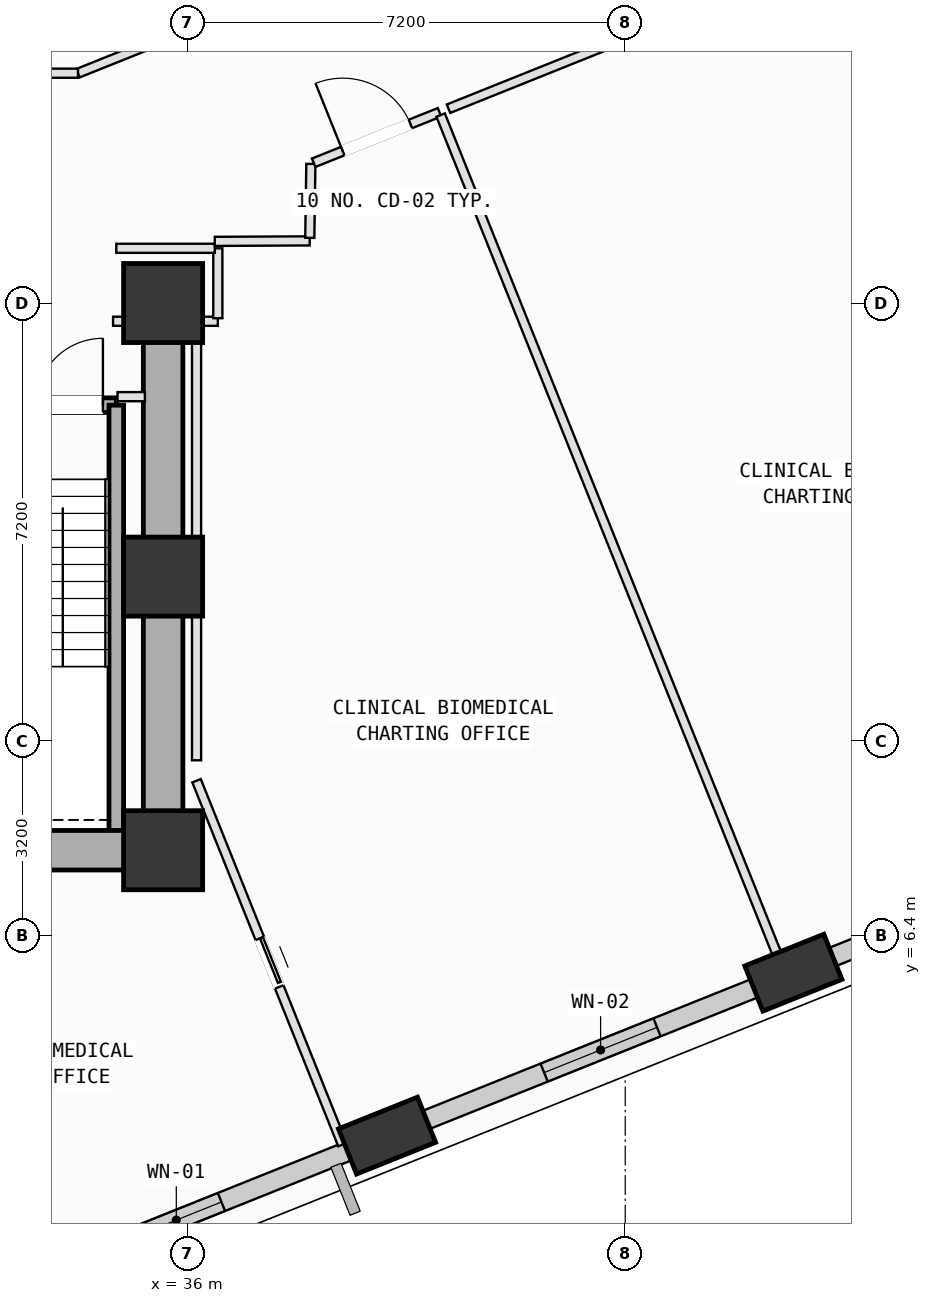
"""IFC4 building model, lengths in metres.
Left out: names, types, materials, properties, quantities, classifications, styles, units other than length and angle.
Written with IfcOpenShell. Run it as: python <this file> out.ifc"""

import sys

from ifc_helpers import new_model, si_unit, direction, frame, frame_2d, origin, origin_2d, place, context, subcontext, project, spatial, rectangle, extrude, element, fill, save


model = new_model("IFC4")
c1 = context("Model", 3, precision=1e-05, world=origin(), true_north=direction((0.0, 1.0)))
c2 = subcontext(c1, "Body", "Model", "MODEL_VIEW")
j1 = project(units=[si_unit("LENGTHUNIT", "METRE"), si_unit("PLANEANGLEUNIT", "RADIAN")], contexts=[c1])
p1 = place(None, origin())
s1 = spatial("IfcSite", under=j1, at=p1, CompositionType="ELEMENT")
p2 = place(p1, origin())
s2 = spatial("IfcBuilding", under=s1, at=p2, CompositionType="ELEMENT")
p3 = place(p2, frame((0.0, 0.0, 116.4)))
s3 = spatial("IfcBuildingStorey", under=s2, at=p3, CompositionType="ELEMENT", Elevation=116.4)
for number, where, z_axis, x_axis in (
    (1, (35.6, 7.8, 0.0), (0.0, 0.0, 1.0), (1.0, 0.0, 0.0)),
    (2, (35.6, 12.3, 0.0), (0.0, 0.0, 1.0), (1.0, 0.0, 0.0)),
    (3, (35.6, 16.8, 0.0), (0.0, 0.0, 1.0), (1.0, 0.0, 0.0)),
):
    element("IfcColumn", number, at=place(p3, frame(where, z_axis=z_axis, x_axis=x_axis)), inside=s3, PredefinedType="COLUMN", context=c2, shape_type="SweptSolid", body=[
        extrude(rectangle(XDim=1.3, YDim=1.3, at=origin_2d()), origin(), (0.0, 0.0, 1.0), 4.0),
    ])
p4 = place(p3, frame((39.282, 3.106, 0.002), z_axis=(0.089357523849, 0.024149038099, 0.995706812717), x_axis=(-0.599896462323, 0.799335620141, 0.034449976294)))
e4 = element("IfcColumn", 4, at=p4, inside=s3, PredefinedType="COLUMN", context=c2, shape_type="SweptSolid", body=[
    extrude(rectangle(XDim=1.4, YDim=0.8, at=origin_2d()), origin(), (0.0, 0.0, 1.0), 4.014),
])
p5 = place(p3, frame((45.965, 5.786, 0.002), z_axis=(0.078035956114, 0.051638758177, 0.995612288096), x_axis=(-0.821217291899, 0.569551828945, 0.034826335313)))
e5 = element("IfcColumn", 5, at=p5, inside=s3, PredefinedType="COLUMN", context=c2, shape_type="SweptSolid", body=[
    extrude(rectangle(XDim=1.4, YDim=0.8, at=origin_2d()), origin(), (0.0, 0.0, 1.0), 4.014),
])
p6 = place(p3, frame((38.993, 2.99, 0.0), z_axis=(0.0, 0.0, 1.0), x_axis=(-0.928164774406, -0.372169519913, 0.0)))
e6 = element("IfcWall", 6, at=p6, inside=s3, PredefinedType="SOLIDWALL", context=c2, shape_type="SweptSolid", body=[
    extrude(rectangle(XDim=6.214, YDim=0.32, at=frame_2d((3.107, 0.0))), origin(), (0.0, 0.0, 1.0), 3.165),
])
p7 = place(p6, frame((2.622, 0.0, 0.75)))
e7 = element("IfcOpeningElement", 7, at=p7, cuts=e6, PredefinedType="OPENING", context=c2, shape_type="SweptSolid", body=[
    extrude(rectangle(XDim=1.6, YDim=1.95, at=frame_2d((0.8, 0.975))), frame((0.0, 0.17, 0.0), z_axis=(0.0, -1.0, 0.0), x_axis=(1.0, 0.0, 0.0)), (0.0, 0.0, 1.0), 0.34),
])
p8 = place(p3, frame((45.677, 5.67, 0.0), z_axis=(0.0, 0.0, 1.0), x_axis=(-0.928164509938, -0.372170179477, 0.0)))
e8 = element("IfcWall", 8, at=p8, inside=s3, PredefinedType="SOLIDWALL", context=c2, shape_type="SweptSolid", body=[
    extrude(rectangle(XDim=6.209, YDim=0.32, at=frame_2d((3.104, 0.0))), origin(), (0.0, 0.0, 1.0), 3.165),
])
p9 = place(p8, frame((2.105, 0.0, 0.75)))
e9 = element("IfcOpeningElement", 9, at=p9, cuts=e8, PredefinedType="OPENING", context=c2, shape_type="SweptSolid", body=[
    extrude(rectangle(XDim=2.0, YDim=1.95, at=frame_2d((1.0, 0.975))), frame((0.0, 0.17, 0.0), z_axis=(0.0, -1.0, 0.0), x_axis=(1.0, 0.0, 0.0)), (0.0, 0.0, 1.0), 0.34),
])
p10 = place(p3, frame((52.366, 8.353, 0.0), z_axis=(0.0, 0.0, 1.0), x_axis=(-0.928164972463, -0.372169025972, 0.0)))
e10 = element("IfcWall", 10, at=p10, inside=s3, PredefinedType="SOLIDWALL", context=c2, shape_type="SweptSolid", body=[
    extrude(rectangle(XDim=6.218, YDim=0.32, at=frame_2d((3.109, 0.0))), origin(), (0.0, 0.0, 1.0), 3.165),
])
p11 = place(p10, frame((2.411, 0.0, 0.75)))
e11 = element("IfcOpeningElement", 11, at=p11, cuts=e10, PredefinedType="OPENING", context=c2, shape_type="SweptSolid", body=[
    extrude(rectangle(XDim=1.4, YDim=1.85, at=frame_2d((0.7, 0.925))), frame((0.0, 0.17, 0.0), z_axis=(0.0, -1.0, 0.0), x_axis=(1.0, 0.0, 0.0)), (0.0, 0.0, 1.0), 0.34),
])
p12 = place(p3, frame((31.37, 15.12, 0.0), z_axis=(0.0, 0.0, 1.0), x_axis=(1.0, 0.0, 0.0)))
e12 = element("IfcWall", 12, at=p12, inside=s3, PredefinedType="SOLIDWALL", context=c2, shape_type="SweptSolid", body=[
    extrude(rectangle(XDim=3.46, YDim=0.24, at=frame_2d((1.73, 0.0))), origin(), (0.0, 0.0, 1.0), 3.78),
])
p13 = place(p12, frame((2.14, 0.0, 0.0)))
e13 = element("IfcOpeningElement", 13, at=p13, cuts=e12, PredefinedType="OPENING", context=c2, shape_type="SweptSolid", body=[
    extrude(rectangle(XDim=1.1, YDim=2.15, at=frame_2d((0.55, 1.075))), frame((0.0, 0.13, 0.0), z_axis=(0.0, -1.0, 0.0), x_axis=(1.0, 0.0, 0.0)), (0.0, 0.0, 1.0), 0.26),
])
p14 = place(p3, frame((34.83, 15.12, 0.0), z_axis=(0.0, 0.0, 1.0), x_axis=(0.0, -1.0, 0.0)))
e14 = element("IfcWall", 14, at=p14, inside=s3, PredefinedType="SOLIDWALL", context=c2, shape_type="SweptSolid", body=[
    extrude(rectangle(XDim=6.995, YDim=0.24, at=frame_2d((3.498, 0.0))), origin(), (0.0, 0.0, 1.0), 3.78),
])
p15 = place(p3, frame((24.8, 7.8, 0.0), z_axis=(0.0, 0.0, 1.0), x_axis=(1.0, 0.0, 0.0)))
e15 = element("IfcWall", 15, at=p15, inside=s3, PredefinedType="SHEAR", context=c2, shape_type="SweptSolid", body=[
    extrude(rectangle(XDim=10.8, YDim=0.65, at=frame_2d((5.4, 0.0))), origin(), (0.0, 0.0, 1.0), 3.78),
])
p16 = place(p3, frame((35.6, 7.8, 0.0), z_axis=(0.0, 0.0, 1.0), x_axis=(0.0, 1.0, 0.0)))
e16 = element("IfcWall", 16, at=p16, inside=s3, PredefinedType="SHEAR", context=c2, shape_type="SweptSolid", body=[
    extrude(rectangle(XDim=9.0, YDim=0.65, at=frame_2d((4.5, 0.0))), origin(), (0.0, 0.0, 1.0), 3.78),
])
p17 = place(p3, frame((36.15, 8.943, 0.0), z_axis=(0.0, 0.0, 1.0), x_axis=(0.372206491807, -0.9281499488, 0.0)))
e17 = element("IfcWall", 17, at=p17, inside=s3, PredefinedType="PARTITIONING", context=c2, shape_type="SweptSolid", body=[
    extrude(rectangle(XDim=6.448, YDim=0.15, at=frame_2d((3.224, 0.0))), origin(), (0.0, 0.0, 1.0), 3.78),
])
p18 = place(p17, frame((2.794, 0.0, 0.0)))
e18 = element("IfcOpeningElement", 18, at=p18, cuts=e17, PredefinedType="OPENING", context=c2, shape_type="SweptSolid", body=[
    extrude(rectangle(XDim=0.86, YDim=2.06, at=frame_2d((0.43, 1.03))), frame((0.0, 0.085, 0.0), z_axis=(0.0, -1.0, 0.0), x_axis=(1.0, 0.0, 0.0)), (0.0, 0.0, 1.0), 0.17),
])
p19 = place(p3, frame((35.6, 7.5, 0.0), z_axis=(0.0, 0.0, 1.0), x_axis=(1.0, 0.0, 0.0)))
e19 = element("IfcWall", 19, at=p19, inside=s3, PredefinedType="PARTITIONING", context=c2, shape_type="SweptSolid", body=[
    extrude(rectangle(XDim=0.55, YDim=0.15, at=frame_2d((0.275, 0.0))), origin(), (0.0, 0.0, 1.0), 2.965),
])
p20 = place(p3, frame((36.15, 7.5, 0.0), z_axis=(0.0, 0.0, 1.0), x_axis=(0.0, 1.0, 0.0)))
e20 = element("IfcWall", 20, at=p20, inside=s3, PredefinedType="PARTITIONING", context=c2, shape_type="SweptSolid", body=[
    extrude(rectangle(XDim=0.744, YDim=0.15, at=frame_2d((0.372, 0.0))), origin(), (0.0, 0.0, 1.0), 3.78),
])
p21 = place(p3, frame((34.777, 16.5, 0.0), z_axis=(0.0, 0.0, 1.0), x_axis=(1.0, 0.0, 0.0)))
e21 = element("IfcWall", 21, at=p21, inside=s3, PredefinedType="PARTITIONING", context=c2, shape_type="SweptSolid", body=[
    extrude(rectangle(XDim=0.523, YDim=0.15, at=frame_2d((0.261, 0.0))), origin(), (0.0, 0.0, 1.0), 2.965),
])
p22 = place(p3, frame((35.9, 16.5, 0.0), z_axis=(0.0, 0.0, 1.0), x_axis=(1.0, 0.0, 0.0)))
e22 = element("IfcWall", 22, at=p22, inside=s3, PredefinedType="PARTITIONING", context=c2, shape_type="SweptSolid", body=[
    extrude(rectangle(XDim=0.6, YDim=0.15, at=frame_2d((0.3, 0.0))), origin(), (0.0, 0.0, 1.0), 2.965),
])
p23 = place(p3, frame((36.5, 16.55, 0.0), z_axis=(0.0, 0.0, 1.0), x_axis=(0.0, 1.0, 0.0)))
e23 = element("IfcWall", 23, at=p23, inside=s3, PredefinedType="PARTITIONING", context=c2, shape_type="SweptSolid", body=[
    extrude(rectangle(XDim=1.15, YDim=0.15, at=frame_2d((0.575, 0.0))), origin(), (0.0, 0.0, 1.0), 3.78),
])
p24 = place(p3, frame((36.45, 17.7, 0.0), z_axis=(0.0, 0.0, 1.0), x_axis=(-1.0, 0.0, 0.0)))
e24 = element("IfcWall", 24, at=p24, inside=s3, PredefinedType="PARTITIONING", context=c2, shape_type="SweptSolid", body=[
    extrude(rectangle(XDim=1.62, YDim=0.15, at=frame_2d((0.81, 0.0))), origin(), (0.0, 0.0, 1.0), 3.78),
])
p25 = place(p3, frame((36.45, 17.814, 0.0), z_axis=(0.0, 0.0, 1.0), x_axis=(0.999986681849, 0.005161019784, 0.0)))
e25 = element("IfcWall", 25, at=p25, inside=s3, PredefinedType="PARTITIONING", context=c2, shape_type="SweptSolid", body=[
    extrude(rectangle(XDim=1.561, YDim=0.15, at=frame_2d((0.781, 0.0))), origin(), (0.0, 0.0, 1.0), 2.965),
])
p26 = place(p3, frame((38.012, 17.872, 0.0), z_axis=(0.0, 0.0, 1.0), x_axis=(0.014857797519, 0.999889616834, 0.0)))
e26 = element("IfcWall", 26, at=p26, inside=s3, PredefinedType="PARTITIONING", context=c2, shape_type="SweptSolid", body=[
    extrude(rectangle(XDim=1.216, YDim=0.15, at=frame_2d((0.608, 0.0))), origin(), (0.0, 0.0, 1.0), 3.78),
])
p27 = place(p3, frame((38.076, 19.107, 0.0), z_axis=(0.0, 0.0, 1.0), x_axis=(0.928098589705, 0.372334537463, 0.0)))
e27 = element("IfcWall", 27, at=p27, inside=s3, PredefinedType="PARTITIONING", context=c2, shape_type="SweptSolid", body=[
    extrude(rectangle(XDim=2.229, YDim=0.15, at=frame_2d((1.115, 0.0))), origin(), (0.0, 0.0, 1.0), 2.945),
])
p28 = place(p27, frame((0.515, 0.0, 0.0)))
e28 = element("IfcOpeningElement", 28, at=p28, cuts=e27, PredefinedType="OPENING", context=c2, shape_type="SweptSolid", body=[
    extrude(rectangle(XDim=1.2, YDim=2.15, at=frame_2d((0.6, 1.075))), frame((0.0, 0.085, 0.0), z_axis=(0.0, -1.0, 0.0), x_axis=(1.0, 0.0, 0.0)), (0.0, 0.0, 1.0), 0.17),
])
p29 = place(p3, frame((40.164, 19.891, 0.0), z_axis=(0.0, 0.0, 1.0), x_axis=(0.372132851531, -0.928179476616, 0.0)))
e29 = element("IfcWall", 29, at=p29, inside=s3, PredefinedType="PARTITIONING", context=c2, shape_type="SweptSolid", body=[
    extrude(rectangle(XDim=15.481, YDim=0.15, at=frame_2d((7.74, 0.0))), origin(), (0.0, 0.0, 1.0), 3.78),
])
p30 = place(p3, frame((39.999, 3.146, 0.0), z_axis=(0.0, 0.0, 1.0), x_axis=(-0.928153569213, -0.372197463663, 0.0)))
e30 = element("IfcWall", 30, at=p30, inside=s3, PredefinedType="PARTITIONING", context=c2, shape_type="SweptSolid", body=[
    extrude(rectangle(XDim=0.991, YDim=0.15, at=frame_2d((0.496, 0.0))), origin(), (0.0, 0.0, 1.0), 3.165),
])
p31 = place(p3, frame((36.15, 9.279, 0.0), z_axis=(0.0, 0.0, 1.0), x_axis=(0.0, 1.0, 0.0)))
e31 = element("IfcWall", 31, at=p31, inside=s3, PredefinedType="PARTITIONING", context=c2, shape_type="SweptSolid", body=[
    extrude(rectangle(XDim=7.061, YDim=0.15, at=frame_2d((3.531, 0.0))), origin(), (0.0, 0.0, 1.0), 3.78),
])
p32 = place(p3, frame((35.3, 15.26, 0.0), z_axis=(0.0, 0.0, 1.0), x_axis=(-1.0, 0.0, 0.0)))
e32 = element("IfcWall", 32, at=p32, inside=s3, PredefinedType="PARTITIONING", context=c2, shape_type="SweptSolid", body=[
    extrude(rectangle(XDim=0.45, YDim=0.15, at=frame_2d((0.225, 0.0))), origin(), (0.0, 0.0, 1.0), 3.78),
])
p33 = place(p3, frame((40.294, 19.996, 0.0), z_axis=(0.0, 0.0, 1.0), x_axis=(0.928134709593, 0.372244490689, 0.0)))
e33 = element("IfcWall", 33, at=p33, inside=s3, PredefinedType="PARTITIONING", context=c2, shape_type="SweptSolid", body=[
    extrude(rectangle(XDim=7.64, YDim=0.15, at=frame_2d((3.82, 0.0))), origin(), (0.0, 0.0, 1.0), 3.78),
])
p34 = place(p33, frame((3.22, 0.0, 0.0)))
e34 = element("IfcOpeningElement", 34, at=p34, cuts=e33, PredefinedType="OPENING", context=c2, shape_type="SweptSolid", body=[
    extrude(rectangle(XDim=1.2, YDim=2.15, at=frame_2d((0.6, 1.075))), frame((0.0, 0.085, 0.0), z_axis=(0.0, -1.0, 0.0), x_axis=(1.0, 0.0, 0.0)), (0.0, 0.0, 1.0), 0.17),
])
p35 = place(p3, frame((46.681, 5.825, 0.0), z_axis=(0.0, 0.0, 1.0), x_axis=(-0.92839940505, -0.371583832673, 0.0)))
e35 = element("IfcWall", 35, at=p35, inside=s3, PredefinedType="PARTITIONING", context=c2, shape_type="SweptSolid", body=[
    extrude(rectangle(XDim=0.654, YDim=0.15, at=frame_2d((0.327, 0.0))), origin(), (0.0, 0.0, 1.0), 3.165),
])
p36 = place(p3, frame((44.853, 24.852, 0.0), z_axis=(0.0, 0.0, 1.0), x_axis=(-0.928153610166, -0.372197361537, 0.0)))
e36 = element("IfcWall", 36, at=p36, inside=s3, PredefinedType="PARTITIONING", context=c2, shape_type="SweptSolid", body=[
    extrude(rectangle(XDim=11.478, YDim=0.15, at=frame_2d((5.739, 0.0))), origin(), (0.0, 0.0, 1.0), 2.945),
])
p37 = place(p36, frame((5.139, 0.0, 0.0)))
e37 = element("IfcOpeningElement", 37, at=p37, cuts=e36, PredefinedType="OPENING", context=c2, shape_type="SweptSolid", body=[
    extrude(rectangle(XDim=1.2, YDim=2.15, at=frame_2d((0.6, 1.075))), frame((0.0, 0.085, 0.0), z_axis=(0.0, -1.0, 0.0), x_axis=(1.0, 0.0, 0.0)), (0.0, 0.0, 1.0), 0.17),
])
p38 = place(p3, frame((34.2, 20.58, 0.0), z_axis=(0.0, 0.0, 1.0), x_axis=(-1.0, 0.0, 0.0)))
e38 = element("IfcWall", 38, at=p38, inside=s3, PredefinedType="PARTITIONING", context=c2, shape_type="SweptSolid", body=[
    extrude(rectangle(XDim=0.839, YDim=0.15, at=frame_2d((0.419, 0.0))), origin(), (0.0, 0.0, 1.0), 3.78),
])
p39 = place(p7, origin())
e39 = element("IfcWindow", 39, at=p39, inside=s3, PartitioningType="SINGLE_PANEL", PredefinedType="WINDOW", context=c2, shape_type="SweptSolid", body=[
    extrude(rectangle(XDim=1.6, YDim=1.95, at=frame_2d((0.8, 0.975))), frame((0.0, 0.03, 0.0), z_axis=(0.0, -1.0, 0.0), x_axis=(1.0, 0.0, 0.0)), (0.0, 0.0, 1.0), 0.06),
])
fill(e7, e39)
p40 = place(p9, origin())
e40 = element("IfcWindow", 40, at=p40, inside=s3, PartitioningType="SINGLE_PANEL", PredefinedType="WINDOW", context=c2, shape_type="SweptSolid", body=[
    extrude(rectangle(XDim=2.0, YDim=1.95, at=frame_2d((1.0, 0.975))), frame((0.0, 0.03, 0.0), z_axis=(0.0, -1.0, 0.0), x_axis=(1.0, 0.0, 0.0)), (0.0, 0.0, 1.0), 0.06),
])
fill(e9, e40)
p41 = place(p13, origin())
e41 = element("IfcDoor", 41, at=p41, inside=s3, OperationType="SINGLE_SWING_RIGHT", PredefinedType="DOOR", context=c2, shape_type="SweptSolid", body=[
    extrude(rectangle(XDim=1.1, YDim=2.15, at=frame_2d((0.55, 1.075))), frame((0.0, 0.025, 0.0), z_axis=(0.0, -1.0, 0.0), x_axis=(1.0, 0.0, 0.0)), (0.0, 0.0, 1.0), 0.05),
])
fill(e13, e41)
p42 = place(p28, origin())
e42 = element("IfcDoor", 42, at=p42, inside=s3, OperationType="SINGLE_SWING_LEFT", PredefinedType="DOOR", context=c2, shape_type="SweptSolid", body=[
    extrude(rectangle(XDim=1.2, YDim=2.15, at=frame_2d((0.6, 1.075))), frame((0.0, 0.025, 0.0), z_axis=(0.0, -1.0, 0.0), x_axis=(1.0, 0.0, 0.0)), (0.0, 0.0, 1.0), 0.05),
])
fill(e28, e42)
p43 = place(p18, origin())
e43 = element("IfcDoor", 43, at=p43, inside=s3, OperationType="SLIDING_TO_LEFT", PredefinedType="DOOR", context=c2, shape_type="SweptSolid", body=[
    extrude(rectangle(XDim=0.86, YDim=2.06, at=frame_2d((0.43, 1.03))), frame((0.0, 0.025, 0.0), z_axis=(0.0, -1.0, 0.0), x_axis=(1.0, 0.0, 0.0)), (0.0, 0.0, 1.0), 0.05),
])
fill(e18, e43)
save(model, sys.argv[1])
